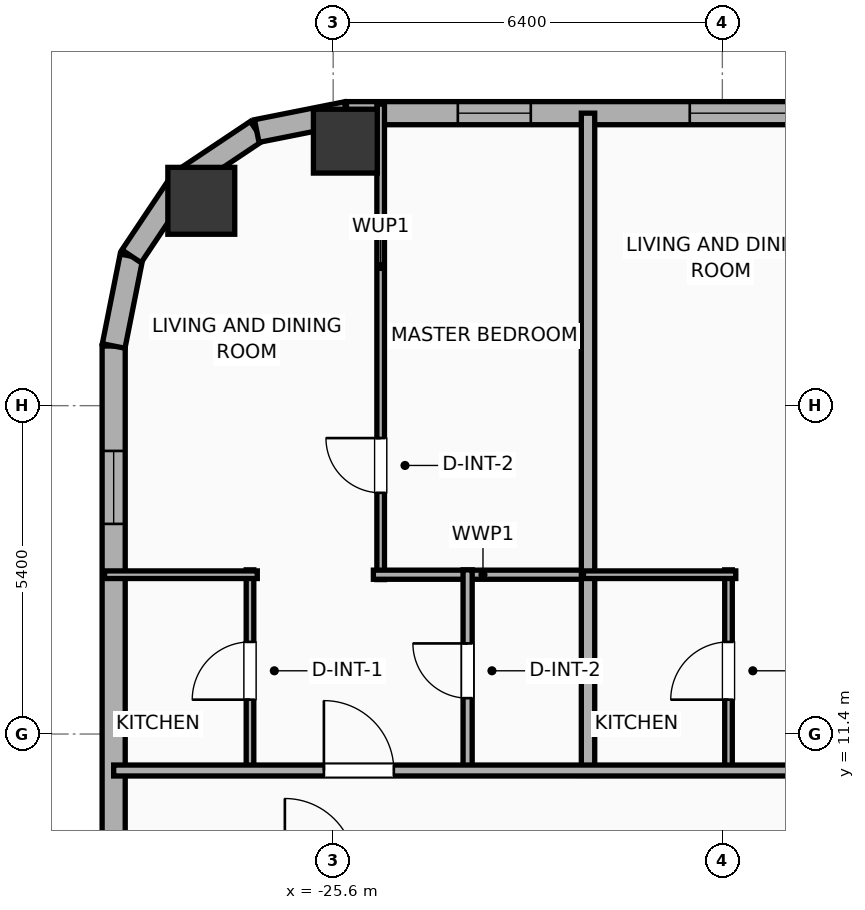
"""IFC4 building model, lengths in metres.
Left out: names, types, materials, properties, quantities, classifications, styles, units other than length and angle.
Written with IfcOpenShell. Run it as: python <this file> out.ifc"""

import sys

from ifc_helpers import new_model, si_unit, direction, frame, frame_2d, origin, origin_2d, place, context, subcontext, project, spatial, rectangle, hollow_rectangle, hollow_circle, extrude, element, fill, save


model = new_model("IFC4")
c1 = context("Model", 3, precision=1e-05, world=origin(), true_north=direction((0.0, 1.0)))
c2 = subcontext(c1, "Body", "Model", "MODEL_VIEW")
j1 = project(units=[si_unit("LENGTHUNIT", "METRE"), si_unit("PLANEANGLEUNIT", "RADIAN")], contexts=[c1])
p1 = place(None, origin())
s1 = spatial("IfcSite", under=j1, at=p1, CompositionType="ELEMENT")
p2 = place(p1, origin())
s2 = spatial("IfcBuilding", under=s1, at=p2, CompositionType="ELEMENT")
p3 = place(p2, frame((0.0, 0.0, 132.6)))
s3 = spatial("IfcBuildingStorey", under=s2, at=p3, CompositionType="ELEMENT", Elevation=132.6)
p4 = place(p3, frame((-25.4, 21.15, 0.0), z_axis=(0.0, 0.0, 1.0), x_axis=(1.0, 0.0, 0.0)))
e1 = element("IfcColumn", 1, at=p4, inside=s3, PredefinedType="COLUMN", context=c2, shape_type="SweptSolid", body=[
    extrude(hollow_rectangle(XDim=1.05, YDim=1.05, WallThickness=0.036, at=origin_2d()), origin(), (0.0, 0.0, 1.0), 3.9),
])
p5 = place(p3, frame((-27.769, 20.169, 0.0), z_axis=(0.0, 0.0, 1.0), x_axis=(1.0, 0.0, 0.0)))
e2 = element("IfcColumn", 2, at=p5, inside=s3, PredefinedType="COLUMN", context=c2, shape_type="SweptSolid", body=[
    extrude(hollow_circle(Radius=0.55, WallThickness=0.036, at=origin_2d()), origin(), (0.0, 0.0, 1.0), 3.9),
])
p6 = place(p3, frame((-29.21, -16.581, 0.0), z_axis=(0.0, 0.0, 1.0), x_axis=(0.0, 1.0, 0.0)))
e3 = element("IfcWall", 3, at=p6, inside=s3, PredefinedType="ELEMENTEDWALL", context=c2, shape_type="SweptSolid", body=[
    extrude(rectangle(XDim=34.363, YDim=0.38, at=frame_2d((17.181, 0.0))), origin(), (0.0, 0.0, 1.0), 3.65),
])
p7 = place(p6, frame((31.437, 0.0, 0.75)))
e4 = element("IfcOpeningElement", 4, at=p7, cuts=e3, PredefinedType="OPENING", context=c2, shape_type="SweptSolid", body=[
    extrude(rectangle(XDim=1.2, YDim=2.05, at=frame_2d((0.6, 1.025))), frame((0.0, 0.2, 0.0), z_axis=(0.0, -1.0, 0.0), x_axis=(1.0, 0.0, 0.0)), (0.0, 0.0, 1.0), 0.4),
])
p8 = place(p6, frame((20.676, 0.0, 0.75)))
e5 = element("IfcOpeningElement", 5, at=p8, cuts=e3, PredefinedType="OPENING", context=c2, shape_type="SweptSolid", body=[
    extrude(rectangle(XDim=1.2, YDim=2.05, at=frame_2d((0.6, 1.025))), frame((0.0, 0.2, 0.0), z_axis=(0.0, -1.0, 0.0), x_axis=(1.0, 0.0, 0.0)), (0.0, 0.0, 1.0), 0.4),
])
p9 = place(p6, frame((11.426, 0.0, 0.75)))
e6 = element("IfcOpeningElement", 6, at=p9, cuts=e3, PredefinedType="OPENING", context=c2, shape_type="SweptSolid", body=[
    extrude(rectangle(XDim=1.2, YDim=2.05, at=frame_2d((0.6, 1.025))), frame((0.0, 0.2, 0.0), z_axis=(0.0, -1.0, 0.0), x_axis=(1.0, 0.0, 0.0)), (0.0, 0.0, 1.0), 0.4),
])
p10 = place(p3, frame((-29.21, 17.781, 0.0), z_axis=(0.0, 0.0, 1.0), x_axis=(0.195086038585, 0.980786132421, 0.0)))
e7 = element("IfcWall", 7, at=p10, inside=s3, PredefinedType="ELEMENTEDWALL", context=c2, shape_type="SweptSolid", body=[
    extrude(rectangle(XDim=1.504, YDim=0.38, at=frame_2d((0.752, 0.0))), origin(), (0.0, 0.0, 1.0), 3.65),
])
p11 = place(p3, frame((-28.917, 19.257, 0.0), z_axis=(0.0, 0.0, 1.0), x_axis=(0.555610286119, 0.831442848281, 0.0)))
e8 = element("IfcWall", 8, at=p11, inside=s3, PredefinedType="ELEMENTEDWALL", context=c2, shape_type="SweptSolid", body=[
    extrude(rectangle(XDim=1.485, YDim=0.38, at=frame_2d((0.743, 0.0))), origin(), (0.0, 0.0, 1.0), 3.65),
])
p12 = place(p3, frame((-28.091, 20.491, 0.0), z_axis=(0.0, 0.0, 1.0), x_axis=(0.831468045563, 0.555572577804, 0.0)))
e9 = element("IfcWall", 9, at=p12, inside=s3, PredefinedType="ELEMENTEDWALL", context=c2, shape_type="SweptSolid", body=[
    extrude(rectangle(XDim=1.485, YDim=0.38, at=frame_2d((0.742, 0.0))), origin(), (0.0, 0.0, 1.0), 3.65),
])
p13 = place(p3, frame((-26.857, 21.316, 0.0), z_axis=(0.0, 0.0, 1.0), x_axis=(0.980755066645, 0.195242155415, 0.0)))
e10 = element("IfcWall", 10, at=p13, inside=s3, PredefinedType="ELEMENTEDWALL", context=c2, shape_type="SweptSolid", body=[
    extrude(rectangle(XDim=1.504, YDim=0.38, at=frame_2d((0.752, 0.0))), origin(), (0.0, 0.0, 1.0), 3.65),
])
p14 = place(p3, frame((-25.381, 21.61, 0.0), z_axis=(0.0, 0.0, 1.0), x_axis=(1.0, 0.0, 0.0)))
e11 = element("IfcWall", 11, at=p14, inside=s3, PredefinedType="ELEMENTEDWALL", context=c2, shape_type="SweptSolid", body=[
    extrude(rectangle(XDim=54.763, YDim=0.38, at=frame_2d((27.381, 0.0))), origin(), (0.0, 0.0, 1.0), 3.65),
])
p15 = place(p14, frame((5.645, 0.0, 0.75)))
e12 = element("IfcOpeningElement", 12, at=p15, cuts=e11, PredefinedType="OPENING", context=c2, shape_type="SweptSolid", body=[
    extrude(rectangle(XDim=2.4, YDim=2.1, at=frame_2d((1.2, 1.05))), frame((0.0, 0.2, 0.0), z_axis=(0.0, -1.0, 0.0), x_axis=(1.0, 0.0, 0.0)), (0.0, 0.0, 1.0), 0.4),
])
p16 = place(p14, frame((45.067, 0.0, 0.75)))
e13 = element("IfcOpeningElement", 13, at=p16, cuts=e11, PredefinedType="OPENING", context=c2, shape_type="SweptSolid", body=[
    extrude(rectangle(XDim=2.4, YDim=2.1, at=frame_2d((1.2, 1.05))), frame((0.0, 0.2, 0.0), z_axis=(0.0, -1.0, 0.0), x_axis=(1.0, 0.0, 0.0)), (0.0, 0.0, 1.0), 0.4),
])
p17 = place(p14, frame((1.831, 0.0, 0.75)))
e14 = element("IfcOpeningElement", 14, at=p17, cuts=e11, PredefinedType="OPENING", context=c2, shape_type="SweptSolid", body=[
    extrude(rectangle(XDim=1.2, YDim=2.05, at=frame_2d((0.6, 1.025))), frame((0.0, 0.2, 0.0), z_axis=(0.0, -1.0, 0.0), x_axis=(1.0, 0.0, 0.0)), (0.0, 0.0, 1.0), 0.4),
])
p18 = place(p14, frame((8.996, 0.0, 0.75)))
e15 = element("IfcOpeningElement", 15, at=p18, cuts=e11, PredefinedType="OPENING", context=c2, shape_type="SweptSolid", body=[
    extrude(rectangle(XDim=1.2, YDim=2.05, at=frame_2d((0.6, 1.025))), frame((0.0, 0.2, 0.0), z_axis=(0.0, -1.0, 0.0), x_axis=(1.0, 0.0, 0.0)), (0.0, 0.0, 1.0), 0.4),
])
p19 = place(p14, frame((15.102, 0.0, 0.75)))
e16 = element("IfcOpeningElement", 16, at=p19, cuts=e11, PredefinedType="OPENING", context=c2, shape_type="SweptSolid", body=[
    extrude(rectangle(XDim=1.2, YDim=2.05, at=frame_2d((0.6, 1.025))), frame((0.0, 0.2, 0.0), z_axis=(0.0, -1.0, 0.0), x_axis=(1.0, 0.0, 0.0)), (0.0, 0.0, 1.0), 0.4),
])
p20 = place(p14, frame((12.352, 0.0, 0.75)))
e17 = element("IfcOpeningElement", 17, at=p20, cuts=e11, PredefinedType="OPENING", context=c2, shape_type="SweptSolid", body=[
    extrude(rectangle(XDim=1.2, YDim=2.05, at=frame_2d((0.6, 1.025))), frame((0.0, 0.2, 0.0), z_axis=(0.0, -1.0, 0.0), x_axis=(1.0, 0.0, 0.0)), (0.0, 0.0, 1.0), 0.4),
])
p21 = place(p14, frame((19.936, 0.0, 0.75)))
e18 = element("IfcOpeningElement", 18, at=p21, cuts=e11, PredefinedType="OPENING", context=c2, shape_type="SweptSolid", body=[
    extrude(rectangle(XDim=1.2, YDim=2.05, at=frame_2d((0.6, 1.025))), frame((0.0, 0.2, 0.0), z_axis=(0.0, -1.0, 0.0), x_axis=(1.0, 0.0, 0.0)), (0.0, 0.0, 1.0), 0.4),
])
p22 = place(p14, frame((17.786, 0.0, 0.75)))
e19 = element("IfcOpeningElement", 19, at=p22, cuts=e11, PredefinedType="OPENING", context=c2, shape_type="SweptSolid", body=[
    extrude(rectangle(XDim=1.2, YDim=2.05, at=frame_2d((0.6, 1.025))), frame((0.0, 0.2, 0.0), z_axis=(0.0, -1.0, 0.0), x_axis=(1.0, 0.0, 0.0)), (0.0, 0.0, 1.0), 0.4),
])
p23 = place(p14, frame((23.826, 0.0, 0.75)))
e20 = element("IfcOpeningElement", 20, at=p23, cuts=e11, PredefinedType="OPENING", context=c2, shape_type="SweptSolid", body=[
    extrude(rectangle(XDim=1.2, YDim=2.05, at=frame_2d((0.6, 1.025))), frame((0.0, 0.2, 0.0), z_axis=(0.0, -1.0, 0.0), x_axis=(1.0, 0.0, 0.0)), (0.0, 0.0, 1.0), 0.4),
])
p24 = place(p14, frame((26.576, 0.0, 0.75)))
e21 = element("IfcOpeningElement", 21, at=p24, cuts=e11, PredefinedType="OPENING", context=c2, shape_type="SweptSolid", body=[
    extrude(rectangle(XDim=1.2, YDim=2.05, at=frame_2d((0.6, 1.025))), frame((0.0, 0.2, 0.0), z_axis=(0.0, -1.0, 0.0), x_axis=(1.0, 0.0, 0.0)), (0.0, 0.0, 1.0), 0.4),
])
p25 = place(p14, frame((30.431, 0.0, 0.75)))
e22 = element("IfcOpeningElement", 22, at=p25, cuts=e11, PredefinedType="OPENING", context=c2, shape_type="SweptSolid", body=[
    extrude(rectangle(XDim=1.2, YDim=2.05, at=frame_2d((0.6, 1.025))), frame((0.0, 0.2, 0.0), z_axis=(0.0, -1.0, 0.0), x_axis=(1.0, 0.0, 0.0)), (0.0, 0.0, 1.0), 0.4),
])
p26 = place(p14, frame((38.581, 0.0, 0.75)))
e23 = element("IfcOpeningElement", 23, at=p26, cuts=e11, PredefinedType="OPENING", context=c2, shape_type="SweptSolid", body=[
    extrude(rectangle(XDim=1.2, YDim=2.05, at=frame_2d((0.6, 1.025))), frame((0.0, 0.2, 0.0), z_axis=(0.0, -1.0, 0.0), x_axis=(1.0, 0.0, 0.0)), (0.0, 0.0, 1.0), 0.4),
])
p27 = place(p14, frame((34.786, 0.0, 0.75)))
e24 = element("IfcOpeningElement", 24, at=p27, cuts=e11, PredefinedType="OPENING", context=c2, shape_type="SweptSolid", body=[
    extrude(rectangle(XDim=1.2, YDim=2.05, at=frame_2d((0.6, 1.025))), frame((0.0, 0.2, 0.0), z_axis=(0.0, -1.0, 0.0), x_axis=(1.0, 0.0, 0.0)), (0.0, 0.0, 1.0), 0.4),
])
p28 = place(p14, frame((41.876, 0.0, 0.75)))
e25 = element("IfcOpeningElement", 25, at=p28, cuts=e11, PredefinedType="OPENING", context=c2, shape_type="SweptSolid", body=[
    extrude(rectangle(XDim=1.2, YDim=2.05, at=frame_2d((0.6, 1.025))), frame((0.0, 0.2, 0.0), z_axis=(0.0, -1.0, 0.0), x_axis=(1.0, 0.0, 0.0)), (0.0, 0.0, 1.0), 0.4),
])
p29 = place(p14, frame((49.385, 0.0, 0.75)))
e26 = element("IfcOpeningElement", 26, at=p29, cuts=e11, PredefinedType="OPENING", context=c2, shape_type="SweptSolid", body=[
    extrude(rectangle(XDim=1.2, YDim=2.05, at=frame_2d((0.6, 1.025))), frame((0.0, 0.2, 0.0), z_axis=(0.0, -1.0, 0.0), x_axis=(1.0, 0.0, 0.0)), (0.0, 0.0, 1.0), 0.4),
])
p30 = place(p14, frame((52.181, 0.0, 0.75)))
e27 = element("IfcOpeningElement", 27, at=p30, cuts=e11, PredefinedType="OPENING", context=c2, shape_type="SweptSolid", body=[
    extrude(rectangle(XDim=1.2, YDim=2.05, at=frame_2d((0.6, 1.025))), frame((0.0, 0.2, 0.0), z_axis=(0.0, -1.0, 0.0), x_axis=(1.0, 0.0, 0.0)), (0.0, 0.0, 1.0), 0.4),
])
p31 = place(p3, frame((-24.819, 13.94, 0.0), z_axis=(0.0, 0.0, 1.0), x_axis=(0.0, 1.0, 0.0)))
e28 = element("IfcWall", 28, at=p31, inside=s3, PredefinedType="PARTITIONING", context=c2, shape_type="SweptSolid", body=[
    extrude(rectangle(XDim=7.82, YDim=0.125, at=frame_2d((3.91, 0.0))), origin(), (0.0, 0.0, 1.0), 3.65),
])
p32 = place(p31, frame((1.427, 0.0, 0.0)))
e29 = element("IfcOpeningElement", 29, at=p32, cuts=e28, PredefinedType="OPENING", context=c2, shape_type="SweptSolid", body=[
    extrude(rectangle(XDim=0.9, YDim=2.05, at=frame_2d((0.45, 1.025))), frame((0.0, 0.073, 0.0), z_axis=(0.0, -1.0, 0.0), x_axis=(1.0, 0.0, 0.0)), (0.0, 0.0, 1.0), 0.145),
])
p33 = place(p3, frame((-24.939, 14.02, 0.0), z_axis=(0.0, 0.0, 1.0), x_axis=(1.0, 0.0, 0.0)))
e30 = element("IfcWall", 30, at=p33, inside=s3, PredefinedType="PLUMBINGWALL", context=c2, shape_type="SweptSolid", body=[
    extrude(rectangle(XDim=3.605, YDim=0.15, at=frame_2d((1.802, 0.0))), origin(), (0.0, 0.0, 1.0), 3.65),
])
p34 = place(p3, frame((-26.968, 10.78, 0.0), z_axis=(0.0, 0.0, 1.0), x_axis=(0.0, 1.0, 0.0)))
e31 = element("IfcWall", 31, at=p34, inside=s3, PredefinedType="PARTITIONING", context=c2, shape_type="SweptSolid", body=[
    extrude(rectangle(XDim=3.32, YDim=0.125, at=frame_2d((1.66, 0.0))), origin(), (0.0, 0.0, 1.0), 3.65),
])
p35 = place(p34, frame((1.185, 0.0, 0.0)))
e32 = element("IfcOpeningElement", 32, at=p35, cuts=e31, PredefinedType="OPENING", context=c2, shape_type="SweptSolid", body=[
    extrude(rectangle(XDim=0.95, YDim=2.05, at=frame_2d((0.475, 1.025))), frame((0.0, 0.073, 0.0), z_axis=(0.0, -1.0, 0.0), x_axis=(1.0, 0.0, 0.0)), (0.0, 0.0, 1.0), 0.145),
])
p36 = place(p3, frame((-29.36, 14.02, 0.0), z_axis=(0.0, 0.0, 1.0), x_axis=(1.0, 0.0, 0.0)))
e33 = element("IfcWall", 33, at=p36, inside=s3, PredefinedType="PARTITIONING", context=c2, shape_type="SweptSolid", body=[
    extrude(rectangle(XDim=2.512, YDim=0.125, at=frame_2d((1.256, 0.0))), origin(), (0.0, 0.0, 1.0), 3.65),
])
p37 = place(p3, frame((-23.389, 10.78, 0.0), z_axis=(0.0, 0.0, 1.0), x_axis=(0.0, 1.0, 0.0)))
e34 = element("IfcWall", 34, at=p37, inside=s3, PredefinedType="PLUMBINGWALL", context=c2, shape_type="SweptSolid", body=[
    extrude(rectangle(XDim=3.32, YDim=0.15, at=frame_2d((1.66, 0.0))), origin(), (0.0, 0.0, 1.0), 3.65),
])
p38 = place(p37, frame((1.21, 0.0, 0.0)))
e35 = element("IfcOpeningElement", 35, at=p38, cuts=e34, PredefinedType="OPENING", context=c2, shape_type="SweptSolid", body=[
    extrude(rectangle(XDim=0.9, YDim=2.05, at=frame_2d((0.45, 1.025))), frame((0.0, 0.085, 0.0), z_axis=(0.0, -1.0, 0.0), x_axis=(1.0, 0.0, 0.0)), (0.0, 0.0, 1.0), 0.17),
])
p39 = place(p3, frame((-21.409, 10.72, 0.0), z_axis=(0.0, 0.0, 1.0), x_axis=(0.0, 1.0, 0.0)))
e36 = element("IfcWall", 36, at=p39, inside=s3, PredefinedType="PARTITIONING", context=c2, shape_type="SweptSolid", body=[
    extrude(rectangle(XDim=10.89, YDim=0.22, at=frame_2d((5.445, 0.0))), origin(), (0.0, 0.0, 1.0), 3.65),
])
p40 = place(p3, frame((-19.099, 10.78, 0.0), z_axis=(0.0, 0.0, 1.0), x_axis=(0.0, 1.0, 0.0)))
e37 = element("IfcWall", 37, at=p40, inside=s3, PredefinedType="PARTITIONING", context=c2, shape_type="SweptSolid", body=[
    extrude(rectangle(XDim=3.32, YDim=0.125, at=frame_2d((1.66, 0.0))), origin(), (0.0, 0.0, 1.0), 3.65),
])
p41 = place(p40, frame((1.185, 0.0, 0.0)))
e38 = element("IfcOpeningElement", 38, at=p41, cuts=e37, PredefinedType="OPENING", context=c2, shape_type="SweptSolid", body=[
    extrude(rectangle(XDim=0.95, YDim=2.05, at=frame_2d((0.475, 1.025))), frame((0.0, 0.073, 0.0), z_axis=(0.0, -1.0, 0.0), x_axis=(1.0, 0.0, 0.0)), (0.0, 0.0, 1.0), 0.145),
])
p42 = place(p3, frame((-21.484, 14.02, 0.0), z_axis=(0.0, 0.0, 1.0), x_axis=(1.0, 0.0, 0.0)))
e39 = element("IfcWall", 39, at=p42, inside=s3, PredefinedType="PARTITIONING", context=c2, shape_type="SweptSolid", body=[
    extrude(rectangle(XDim=2.505, YDim=0.125, at=frame_2d((1.252, 0.0))), origin(), (0.0, 0.0, 1.0), 3.65),
])
p43 = place(p3, frame((-29.21, 10.8, 0.0), z_axis=(0.0, 0.0, 1.0), x_axis=(1.0, 0.0, 0.0)))
e40 = element("IfcWall", 40, at=p43, inside=s3, PredefinedType="PARTITIONING", context=c2, shape_type="SweptSolid", body=[
    extrude(rectangle(XDim=62.42, YDim=0.18, at=frame_2d((31.21, 0.0))), origin(), (0.0, 0.0, 1.0), 3.65),
])
p44 = place(p43, frame((3.457, 0.0, 0.0)))
e41 = element("IfcOpeningElement", 41, at=p44, cuts=e40, PredefinedType="OPENING", context=c2, shape_type="SweptSolid", body=[
    extrude(rectangle(XDim=1.15, YDim=2.05, at=frame_2d((0.575, 1.025))), frame((0.0, 0.1, 0.0), z_axis=(0.0, -1.0, 0.0), x_axis=(1.0, 0.0, 0.0)), (0.0, 0.0, 1.0), 0.2),
])
p45 = place(p43, frame((11.297, 0.0, 0.0)))
e42 = element("IfcOpeningElement", 42, at=p45, cuts=e40, PredefinedType="OPENING", context=c2, shape_type="SweptSolid", body=[
    extrude(rectangle(XDim=1.15, YDim=2.05, at=frame_2d((0.575, 1.025))), frame((0.0, 0.1, 0.0), z_axis=(0.0, -1.0, 0.0), x_axis=(1.0, 0.0, 0.0)), (0.0, 0.0, 1.0), 0.2),
])
p46 = place(p43, frame((18.925, 0.0, 0.0)))
e43 = element("IfcOpeningElement", 43, at=p46, cuts=e40, PredefinedType="OPENING", context=c2, shape_type="SweptSolid", body=[
    extrude(rectangle(XDim=1.15, YDim=2.05, at=frame_2d((0.575, 1.025))), frame((0.0, 0.1, 0.0), z_axis=(0.0, -1.0, 0.0), x_axis=(1.0, 0.0, 0.0)), (0.0, 0.0, 1.0), 0.2),
])
p47 = place(p43, frame((24.362, 0.0, 0.0)))
e44 = element("IfcOpeningElement", 44, at=p47, cuts=e40, PredefinedType="OPENING", context=c2, shape_type="SweptSolid", body=[
    extrude(rectangle(XDim=1.15, YDim=2.05, at=frame_2d((0.575, 1.025))), frame((0.0, 0.1, 0.0), z_axis=(0.0, -1.0, 0.0), x_axis=(1.0, 0.0, 0.0)), (0.0, 0.0, 1.0), 0.2),
])
p48 = place(p43, frame((27.708, 0.0, 0.0)))
e45 = element("IfcOpeningElement", 45, at=p48, cuts=e40, PredefinedType="OPENING", context=c2, shape_type="SweptSolid", body=[
    extrude(rectangle(XDim=1.15, YDim=2.05, at=frame_2d((0.575, 1.025))), frame((0.0, 0.1, 0.0), z_axis=(0.0, -1.0, 0.0), x_axis=(1.0, 0.0, 0.0)), (0.0, 0.0, 1.0), 0.2),
])
p49 = place(p43, frame((34.618, 0.0, 0.0)))
e46 = element("IfcOpeningElement", 46, at=p49, cuts=e40, PredefinedType="OPENING", context=c2, shape_type="SweptSolid", body=[
    extrude(rectangle(XDim=0.9, YDim=2.05, at=frame_2d((0.45, 1.025))), frame((0.0, 0.1, 0.0), z_axis=(0.0, -1.0, 0.0), x_axis=(1.0, 0.0, 0.0)), (0.0, 0.0, 1.0), 0.2),
])
p50 = place(p43, frame((43.106, 0.0, 0.0)))
e47 = element("IfcOpeningElement", 47, at=p50, cuts=e40, PredefinedType="OPENING", context=c2, shape_type="SweptSolid", body=[
    extrude(rectangle(XDim=1.15, YDim=2.05, at=frame_2d((0.575, 1.025))), frame((0.0, 0.1, 0.0), z_axis=(0.0, -1.0, 0.0), x_axis=(1.0, 0.0, 0.0)), (0.0, 0.0, 1.0), 0.2),
])
p51 = place(p43, frame((51.777, 0.0, 0.0)))
e48 = element("IfcOpeningElement", 48, at=p51, cuts=e40, PredefinedType="OPENING", context=c2, shape_type="SweptSolid", body=[
    extrude(rectangle(XDim=0.9, YDim=2.05, at=frame_2d((0.45, 1.025))), frame((0.0, 0.1, 0.0), z_axis=(0.0, -1.0, 0.0), x_axis=(1.0, 0.0, 0.0)), (0.0, 0.0, 1.0), 0.2),
])
p52 = place(p43, frame((58.718, 0.0, 0.0)))
e49 = element("IfcOpeningElement", 49, at=p52, cuts=e40, PredefinedType="OPENING", context=c2, shape_type="SweptSolid", body=[
    extrude(rectangle(XDim=0.9, YDim=2.05, at=frame_2d((0.45, 1.025))), frame((0.0, 0.1, 0.0), z_axis=(0.0, -1.0, 0.0), x_axis=(1.0, 0.0, 0.0)), (0.0, 0.0, 1.0), 0.2),
])
p53 = place(p15, origin())
e50 = element("IfcWindow", 50, at=p53, inside=s3, PartitioningType="SINGLE_PANEL", PredefinedType="WINDOW", context=c2, shape_type="SweptSolid", body=[
    extrude(rectangle(XDim=2.4, YDim=2.1, at=frame_2d((1.2, 1.05))), frame((0.0, 0.03, 0.0), z_axis=(0.0, -1.0, 0.0), x_axis=(1.0, 0.0, 0.0)), (0.0, 0.0, 1.0), 0.06),
])
fill(e12, e50)
p54 = place(p7, origin())
e51 = element("IfcWindow", 51, at=p54, inside=s3, PartitioningType="SINGLE_PANEL", PredefinedType="WINDOW", context=c2, shape_type="SweptSolid", body=[
    extrude(rectangle(XDim=1.2, YDim=2.05, at=frame_2d((0.6, 1.025))), frame((0.0, 0.03, 0.0), z_axis=(0.0, -1.0, 0.0), x_axis=(1.0, 0.0, 0.0)), (0.0, 0.0, 1.0), 0.06),
])
fill(e4, e51)
p55 = place(p17, origin())
e52 = element("IfcWindow", 52, at=p55, inside=s3, PartitioningType="SINGLE_PANEL", PredefinedType="WINDOW", context=c2, shape_type="SweptSolid", body=[
    extrude(rectangle(XDim=1.2, YDim=2.05, at=frame_2d((0.6, 1.025))), frame((0.0, 0.03, 0.0), z_axis=(0.0, -1.0, 0.0), x_axis=(1.0, 0.0, 0.0)), (0.0, 0.0, 1.0), 0.06),
])
fill(e14, e52)
p56 = place(p32, origin())
e53 = element("IfcDoor", 53, at=p56, inside=s3, OperationType="SINGLE_SWING_RIGHT", PredefinedType="DOOR", context=c2, shape_type="SweptSolid", body=[
    extrude(rectangle(XDim=0.9, YDim=2.05, at=frame_2d((0.45, 1.025))), frame((0.0, 0.025, 0.0), z_axis=(0.0, -1.0, 0.0), x_axis=(1.0, 0.0, 0.0)), (0.0, 0.0, 1.0), 0.05),
])
fill(e29, e53)
p57 = place(p35, origin())
e54 = element("IfcDoor", 54, at=p57, inside=s3, OperationType="SINGLE_SWING_LEFT", PredefinedType="DOOR", context=c2, shape_type="SweptSolid", body=[
    extrude(rectangle(XDim=0.95, YDim=2.05, at=frame_2d((0.475, 1.025))), frame((0.0, 0.025, 0.0), z_axis=(0.0, -1.0, 0.0), x_axis=(1.0, 0.0, 0.0)), (0.0, 0.0, 1.0), 0.05),
])
fill(e32, e54)
p58 = place(p38, origin())
e55 = element("IfcDoor", 55, at=p58, inside=s3, OperationType="SINGLE_SWING_RIGHT", PredefinedType="DOOR", context=c2, shape_type="SweptSolid", body=[
    extrude(rectangle(XDim=0.9, YDim=2.05, at=frame_2d((0.45, 1.025))), frame((0.0, 0.025, 0.0), z_axis=(0.0, -1.0, 0.0), x_axis=(1.0, 0.0, 0.0)), (0.0, 0.0, 1.0), 0.05),
])
fill(e35, e55)
p59 = place(p41, origin())
e56 = element("IfcDoor", 56, at=p59, inside=s3, OperationType="SINGLE_SWING_LEFT", PredefinedType="DOOR", context=c2, shape_type="SweptSolid", body=[
    extrude(rectangle(XDim=0.95, YDim=2.05, at=frame_2d((0.475, 1.025))), frame((0.0, 0.025, 0.0), z_axis=(0.0, -1.0, 0.0), x_axis=(1.0, 0.0, 0.0)), (0.0, 0.0, 1.0), 0.05),
])
fill(e38, e56)
p60 = place(p44, origin())
e57 = element("IfcDoor", 57, at=p60, inside=s3, OperationType="SINGLE_SWING_LEFT", PredefinedType="DOOR", context=c2, shape_type="SweptSolid", body=[
    extrude(rectangle(XDim=1.15, YDim=2.05, at=frame_2d((0.575, 1.025))), frame((0.0, 0.025, 0.0), z_axis=(0.0, -1.0, 0.0), x_axis=(1.0, 0.0, 0.0)), (0.0, 0.0, 1.0), 0.05),
])
fill(e41, e57)
save(model, sys.argv[1])
